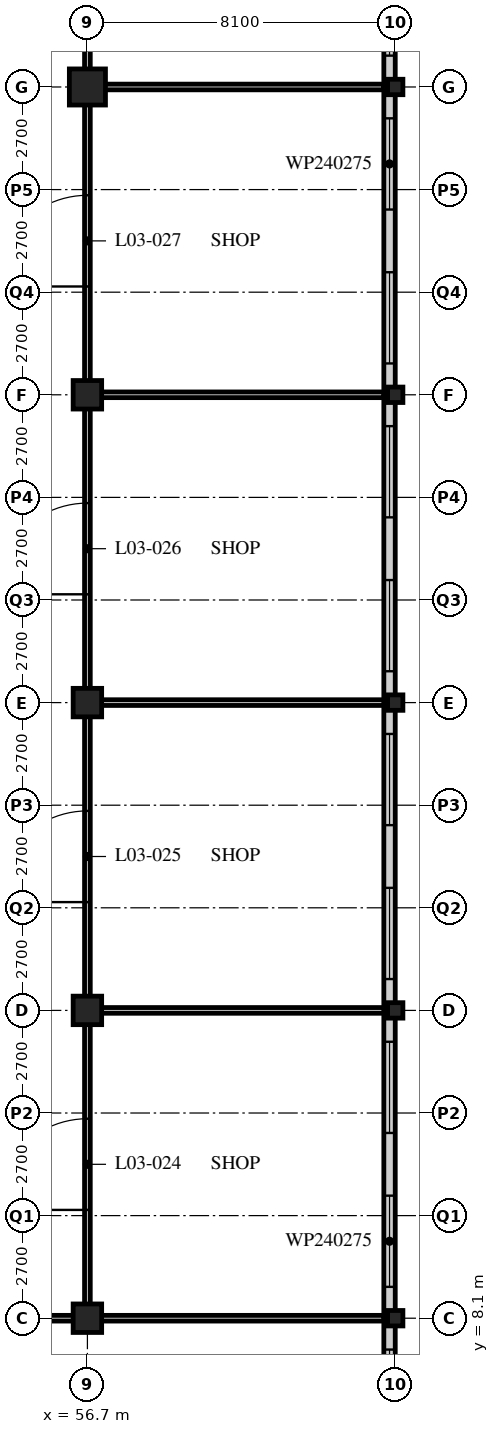
"""IFC4 building model, lengths in metres.
Left out: names, types, materials, properties, quantities, classifications, styles, units other than length and angle.
Written with IfcOpenShell. Run it as: python <this file> out.ifc"""

import sys

from ifc_helpers import new_model, si_unit, direction, frame, frame_2d, origin, origin_2d, place, context, subcontext, project, spatial, rectangle, hollow_rectangle, i_section, extrude, element, fill, save


model = new_model("IFC4")
c1 = context("Model", 3, precision=1e-05, world=origin(), true_north=direction((0.0, 1.0)))
c2 = subcontext(c1, "Body", "Model", "MODEL_VIEW")
j1 = project(units=[si_unit("LENGTHUNIT", "METRE"), si_unit("PLANEANGLEUNIT", "RADIAN")], contexts=[c1])
p1 = place(None, origin())
s1 = spatial("IfcSite", under=j1, at=p1, CompositionType="ELEMENT")
p2 = place(p1, origin())
s2 = spatial("IfcBuilding", under=s1, at=p2, CompositionType="ELEMENT")
p3 = place(p2, frame((0.0, 0.0, 16.8)))
s3 = spatial("IfcBuildingStorey", under=s2, at=p3, CompositionType="ELEMENT", Elevation=16.8)
for number, where, z_axis, x_axis in (
    (1, (56.7, 8.1, 0.0), (0.0, 0.0, 1.0), (1.0, 0.0, 0.0)),
    (2, (56.7, 16.2, 0.0), (0.0, 0.0, 1.0), (1.0, 0.0, 0.0)),
    (3, (56.7, 24.3, 0.0), (0.0, 0.0, 1.0), (1.0, 0.0, 0.0)),
    (4, (56.7, 32.4, 0.0), (0.0, 0.0, 1.0), (1.0, 0.0, 0.0)),
):
    element("IfcColumn", number, at=place(p3, frame(where, z_axis=z_axis, x_axis=x_axis)), inside=s3, PredefinedType="COLUMN", context=c2, shape_type="SweptSolid", body=[
        extrude(hollow_rectangle(XDim=0.75, YDim=0.75, WallThickness=0.07, at=origin_2d()), origin(), (0.0, 0.0, 1.0), 5.4),
    ])
p4 = place(p3, frame((56.7, 40.5, 0.0), z_axis=(0.0, 0.0, 1.0), x_axis=(1.0, 0.0, 0.0)))
e5 = element("IfcColumn", 5, at=p4, inside=s3, PredefinedType="COLUMN", context=c2, shape_type="SweptSolid", body=[
    extrude(hollow_rectangle(XDim=0.95, YDim=0.95, WallThickness=0.1, at=origin_2d()), origin(), (0.0, 0.0, 1.0), 5.4),
])
for number, where, z_axis, x_axis in (
    (6, (64.8, 8.1, 0.0), (0.0, 0.0, 1.0), (1.0, 0.0, 0.0)),
    (7, (64.8, 16.2, 0.0), (0.0, 0.0, 1.0), (1.0, 0.0, 0.0)),
    (8, (64.8, 24.3, 0.0), (0.0, 0.0, 1.0), (1.0, 0.0, 0.0)),
    (9, (64.8, 32.4, 0.0), (0.0, 0.0, 1.0), (1.0, 0.0, 0.0)),
    (10, (64.8, 40.5, 0.0), (0.0, 0.0, 1.0), (1.0, 0.0, 0.0)),
):
    element("IfcColumn", number, at=place(p3, frame(where, z_axis=z_axis, x_axis=x_axis)), inside=s3, PredefinedType="COLUMN", context=c2, shape_type="SweptSolid", body=[
        extrude(i_section(OverallWidth=0.403, OverallDepth=0.406, WebThickness=0.027, FlangeThickness=0.043, FilletRadius=0.015, at=origin_2d()), origin(), (0.0, 0.0, 1.0), 5.4),
    ])
p5 = place(p3, frame((64.65, 0.24, 0.0), z_axis=(0.0, 0.0, 1.0), x_axis=(0.0, 1.0, 0.0)))
e11 = element("IfcWall", 11, at=p5, inside=s3, PredefinedType="SOLIDWALL", context=c2, shape_type="SweptSolid", body=[
    extrude(rectangle(XDim=48.36, YDim=0.3, at=frame_2d((24.18, 0.0))), origin(), (0.0, 0.0, 1.0), 5.15),
])
p6 = place(p5, frame((0.585, 0.0, 1.0)))
e12 = element("IfcOpeningElement", 12, at=p6, cuts=e11, PredefinedType="OPENING", context=c2, shape_type="SweptSolid", body=[
    extrude(rectangle(XDim=2.4, YDim=2.75, at=frame_2d((1.2, 1.375))), frame((0.0, 0.16, 0.0), z_axis=(0.0, -1.0, 0.0), x_axis=(1.0, 0.0, 0.0)), (0.0, 0.0, 1.0), 0.32),
])
p7 = place(p5, frame((4.635, 0.0, 1.0)))
e13 = element("IfcOpeningElement", 13, at=p7, cuts=e11, PredefinedType="OPENING", context=c2, shape_type="SweptSolid", body=[
    extrude(rectangle(XDim=2.4, YDim=2.75, at=frame_2d((1.2, 1.375))), frame((0.0, 0.16, 0.0), z_axis=(0.0, -1.0, 0.0), x_axis=(1.0, 0.0, 0.0)), (0.0, 0.0, 1.0), 0.32),
])
p8 = place(p5, frame((8.685, 0.0, 1.0)))
e14 = element("IfcOpeningElement", 14, at=p8, cuts=e11, PredefinedType="OPENING", context=c2, shape_type="SweptSolid", body=[
    extrude(rectangle(XDim=2.4, YDim=2.75, at=frame_2d((1.2, 1.375))), frame((0.0, 0.16, 0.0), z_axis=(0.0, -1.0, 0.0), x_axis=(1.0, 0.0, 0.0)), (0.0, 0.0, 1.0), 0.32),
])
p9 = place(p5, frame((12.735, 0.0, 1.0)))
e15 = element("IfcOpeningElement", 15, at=p9, cuts=e11, PredefinedType="OPENING", context=c2, shape_type="SweptSolid", body=[
    extrude(rectangle(XDim=2.4, YDim=2.75, at=frame_2d((1.2, 1.375))), frame((0.0, 0.16, 0.0), z_axis=(0.0, -1.0, 0.0), x_axis=(1.0, 0.0, 0.0)), (0.0, 0.0, 1.0), 0.32),
])
p10 = place(p5, frame((16.785, 0.0, 1.0)))
e16 = element("IfcOpeningElement", 16, at=p10, cuts=e11, PredefinedType="OPENING", context=c2, shape_type="SweptSolid", body=[
    extrude(rectangle(XDim=2.4, YDim=2.75, at=frame_2d((1.2, 1.375))), frame((0.0, 0.16, 0.0), z_axis=(0.0, -1.0, 0.0), x_axis=(1.0, 0.0, 0.0)), (0.0, 0.0, 1.0), 0.32),
])
p11 = place(p5, frame((20.835, 0.0, 1.0)))
e17 = element("IfcOpeningElement", 17, at=p11, cuts=e11, PredefinedType="OPENING", context=c2, shape_type="SweptSolid", body=[
    extrude(rectangle(XDim=2.4, YDim=2.75, at=frame_2d((1.2, 1.375))), frame((0.0, 0.16, 0.0), z_axis=(0.0, -1.0, 0.0), x_axis=(1.0, 0.0, 0.0)), (0.0, 0.0, 1.0), 0.32),
])
p12 = place(p5, frame((24.885, 0.0, 1.0)))
e18 = element("IfcOpeningElement", 18, at=p12, cuts=e11, PredefinedType="OPENING", context=c2, shape_type="SweptSolid", body=[
    extrude(rectangle(XDim=2.4, YDim=2.75, at=frame_2d((1.2, 1.375))), frame((0.0, 0.16, 0.0), z_axis=(0.0, -1.0, 0.0), x_axis=(1.0, 0.0, 0.0)), (0.0, 0.0, 1.0), 0.32),
])
p13 = place(p5, frame((28.935, 0.0, 1.0)))
e19 = element("IfcOpeningElement", 19, at=p13, cuts=e11, PredefinedType="OPENING", context=c2, shape_type="SweptSolid", body=[
    extrude(rectangle(XDim=2.4, YDim=2.75, at=frame_2d((1.2, 1.375))), frame((0.0, 0.16, 0.0), z_axis=(0.0, -1.0, 0.0), x_axis=(1.0, 0.0, 0.0)), (0.0, 0.0, 1.0), 0.32),
])
p14 = place(p5, frame((32.985, 0.0, 1.0)))
e20 = element("IfcOpeningElement", 20, at=p14, cuts=e11, PredefinedType="OPENING", context=c2, shape_type="SweptSolid", body=[
    extrude(rectangle(XDim=2.4, YDim=2.75, at=frame_2d((1.2, 1.375))), frame((0.0, 0.16, 0.0), z_axis=(0.0, -1.0, 0.0), x_axis=(1.0, 0.0, 0.0)), (0.0, 0.0, 1.0), 0.32),
])
p15 = place(p5, frame((37.035, 0.0, 1.0)))
e21 = element("IfcOpeningElement", 21, at=p15, cuts=e11, PredefinedType="OPENING", context=c2, shape_type="SweptSolid", body=[
    extrude(rectangle(XDim=2.4, YDim=2.75, at=frame_2d((1.2, 1.375))), frame((0.0, 0.16, 0.0), z_axis=(0.0, -1.0, 0.0), x_axis=(1.0, 0.0, 0.0)), (0.0, 0.0, 1.0), 0.32),
])
p16 = place(p5, frame((41.085, 0.0, 1.0)))
e22 = element("IfcOpeningElement", 22, at=p16, cuts=e11, PredefinedType="OPENING", context=c2, shape_type="SweptSolid", body=[
    extrude(rectangle(XDim=2.4, YDim=2.75, at=frame_2d((1.2, 1.375))), frame((0.0, 0.16, 0.0), z_axis=(0.0, -1.0, 0.0), x_axis=(1.0, 0.0, 0.0)), (0.0, 0.0, 1.0), 0.32),
])
p17 = place(p5, frame((45.135, 0.0, 1.0)))
e23 = element("IfcOpeningElement", 23, at=p17, cuts=e11, PredefinedType="OPENING", context=c2, shape_type="SweptSolid", body=[
    extrude(rectangle(XDim=2.4, YDim=2.75, at=frame_2d((1.2, 1.375))), frame((0.0, 0.16, 0.0), z_axis=(0.0, -1.0, 0.0), x_axis=(1.0, 0.0, 0.0)), (0.0, 0.0, 1.0), 0.32),
])
p18 = place(p3, frame((8.1, 8.1, 0.0), z_axis=(0.0, 0.0, 1.0), x_axis=(1.0, 0.0, 0.0)))
e24 = element("IfcWall", 24, at=p18, inside=s3, PredefinedType="PARTITIONING", context=c2, shape_type="SweptSolid", body=[
    extrude(rectangle(XDim=48.6, YDim=0.15, at=frame_2d((24.3, 0.0))), origin(), (0.0, 0.0, 1.0), 4.538),
])
p19 = place(p18, frame((11.25, 0.0, 0.0)))
e25 = element("IfcOpeningElement", 25, at=p19, cuts=e24, PredefinedType="OPENING", context=c2, shape_type="SweptSolid", body=[
    extrude(rectangle(XDim=1.8, YDim=2.4, at=frame_2d((0.9, 1.2))), frame((0.0, 0.085, 0.0), z_axis=(0.0, -1.0, 0.0), x_axis=(1.0, 0.0, 0.0)), (0.0, 0.0, 1.0), 0.17),
])
p20 = place(p18, frame((19.05, 0.0, 0.0)))
e26 = element("IfcOpeningElement", 26, at=p20, cuts=e24, PredefinedType="OPENING", context=c2, shape_type="SweptSolid", body=[
    extrude(rectangle(XDim=2.4, YDim=2.7, at=frame_2d((1.2, 1.35))), frame((0.0, 0.085, 0.0), z_axis=(0.0, -1.0, 0.0), x_axis=(1.0, 0.0, 0.0)), (0.0, 0.0, 1.0), 0.17),
])
p21 = place(p18, frame((27.15, 0.0, 0.0)))
e27 = element("IfcOpeningElement", 27, at=p21, cuts=e24, PredefinedType="OPENING", context=c2, shape_type="SweptSolid", body=[
    extrude(rectangle(XDim=2.4, YDim=2.7, at=frame_2d((1.2, 1.35))), frame((0.0, 0.085, 0.0), z_axis=(0.0, -1.0, 0.0), x_axis=(1.0, 0.0, 0.0)), (0.0, 0.0, 1.0), 0.17),
])
p22 = place(p18, frame((35.25, 0.0, 0.0)))
e28 = element("IfcOpeningElement", 28, at=p22, cuts=e24, PredefinedType="OPENING", context=c2, shape_type="SweptSolid", body=[
    extrude(rectangle(XDim=2.4, YDim=2.7, at=frame_2d((1.2, 1.35))), frame((0.0, 0.085, 0.0), z_axis=(0.0, -1.0, 0.0), x_axis=(1.0, 0.0, 0.0)), (0.0, 0.0, 1.0), 0.17),
])
p23 = place(p18, frame((2.85, 0.0, 0.0)))
e29 = element("IfcOpeningElement", 29, at=p23, cuts=e24, PredefinedType="OPENING", context=c2, shape_type="SweptSolid", body=[
    extrude(rectangle(XDim=2.4, YDim=2.7, at=frame_2d((1.2, 1.35))), frame((0.0, 0.085, 0.0), z_axis=(0.0, -1.0, 0.0), x_axis=(1.0, 0.0, 0.0)), (0.0, 0.0, 1.0), 0.17),
])
p24 = place(p18, frame((43.35, 0.0, 0.0)))
e30 = element("IfcOpeningElement", 30, at=p24, cuts=e24, PredefinedType="OPENING", context=c2, shape_type="SweptSolid", body=[
    extrude(rectangle(XDim=2.4, YDim=2.7, at=frame_2d((1.2, 1.35))), frame((0.0, 0.085, 0.0), z_axis=(0.0, -1.0, 0.0), x_axis=(1.0, 0.0, 0.0)), (0.0, 0.0, 1.0), 0.17),
])
p25 = place(p3, frame((56.7, 8.1, 0.0), z_axis=(0.0, 0.0, 1.0), x_axis=(0.0, 1.0, 0.0)))
e31 = element("IfcWall", 31, at=p25, inside=s3, PredefinedType="PARTITIONING", context=c2, shape_type="SweptSolid", body=[
    extrude(rectangle(XDim=34.35, YDim=0.15, at=frame_2d((17.175, 0.0))), origin(), (0.0, 0.0, 1.0), 4.538),
])
p26 = place(p25, frame((2.85, 0.0, 0.0)))
e32 = element("IfcOpeningElement", 32, at=p26, cuts=e31, PredefinedType="OPENING", context=c2, shape_type="SweptSolid", body=[
    extrude(rectangle(XDim=2.4, YDim=2.7, at=frame_2d((1.2, 1.35))), frame((0.0, 0.085, 0.0), z_axis=(0.0, -1.0, 0.0), x_axis=(1.0, 0.0, 0.0)), (0.0, 0.0, 1.0), 0.17),
])
p27 = place(p25, frame((10.95, 0.0, 0.0)))
e33 = element("IfcOpeningElement", 33, at=p27, cuts=e31, PredefinedType="OPENING", context=c2, shape_type="SweptSolid", body=[
    extrude(rectangle(XDim=2.4, YDim=2.7, at=frame_2d((1.2, 1.35))), frame((0.0, 0.085, 0.0), z_axis=(0.0, -1.0, 0.0), x_axis=(1.0, 0.0, 0.0)), (0.0, 0.0, 1.0), 0.17),
])
p28 = place(p25, frame((19.05, 0.0, 0.0)))
e34 = element("IfcOpeningElement", 34, at=p28, cuts=e31, PredefinedType="OPENING", context=c2, shape_type="SweptSolid", body=[
    extrude(rectangle(XDim=2.4, YDim=2.7, at=frame_2d((1.2, 1.35))), frame((0.0, 0.085, 0.0), z_axis=(0.0, -1.0, 0.0), x_axis=(1.0, 0.0, 0.0)), (0.0, 0.0, 1.0), 0.17),
])
p29 = place(p25, frame((27.15, 0.0, 0.0)))
e35 = element("IfcOpeningElement", 35, at=p29, cuts=e31, PredefinedType="OPENING", context=c2, shape_type="SweptSolid", body=[
    extrude(rectangle(XDim=2.4, YDim=2.7, at=frame_2d((1.2, 1.35))), frame((0.0, 0.085, 0.0), z_axis=(0.0, -1.0, 0.0), x_axis=(1.0, 0.0, 0.0)), (0.0, 0.0, 1.0), 0.17),
])
for number, where, z_axis, x_axis in (
    (36, (56.7, 16.2, 0.0), (0.0, 0.0, 1.0), (1.0, 0.0, 0.0)),
    (37, (56.7, 24.3, 0.0), (0.0, 0.0, 1.0), (1.0, 0.0, 0.0)),
    (38, (56.7, 32.4, 0.0), (0.0, 0.0, 1.0), (1.0, 0.0, 0.0)),
    (39, (56.7, 8.1, 0.0), (0.0, 0.0, 1.0), (1.0, 0.0, 0.0)),
    (40, (56.7, 40.5, 0.0), (0.0, 0.0, 1.0), (1.0, 0.0, 0.0)),
):
    element("IfcWall", number, at=place(p3, frame(where, z_axis=z_axis, x_axis=x_axis)), inside=s3, PredefinedType="PARTITIONING", context=c2, shape_type="SweptSolid", body=[
        extrude(rectangle(XDim=7.8, YDim=0.15, at=frame_2d((3.9, 0.0))), origin(), (0.0, 0.0, 1.0), 4.538),
    ])
p30 = place(p7, origin())
e41 = element("IfcWindow", 41, at=p30, inside=s3, PartitioningType="SINGLE_PANEL", PredefinedType="WINDOW", context=c2, shape_type="SweptSolid", body=[
    extrude(rectangle(XDim=2.4, YDim=2.75, at=frame_2d((1.2, 1.375))), frame((0.0, 0.03, 0.0), z_axis=(0.0, -1.0, 0.0), x_axis=(1.0, 0.0, 0.0)), (0.0, 0.0, 1.0), 0.06),
])
fill(e13, e41)
p31 = place(p8, origin())
e42 = element("IfcWindow", 42, at=p31, inside=s3, PartitioningType="SINGLE_PANEL", PredefinedType="WINDOW", context=c2, shape_type="SweptSolid", body=[
    extrude(rectangle(XDim=2.4, YDim=2.75, at=frame_2d((1.2, 1.375))), frame((0.0, 0.03, 0.0), z_axis=(0.0, -1.0, 0.0), x_axis=(1.0, 0.0, 0.0)), (0.0, 0.0, 1.0), 0.06),
])
fill(e14, e42)
p32 = place(p9, origin())
e43 = element("IfcWindow", 43, at=p32, inside=s3, PartitioningType="SINGLE_PANEL", PredefinedType="WINDOW", context=c2, shape_type="SweptSolid", body=[
    extrude(rectangle(XDim=2.4, YDim=2.75, at=frame_2d((1.2, 1.375))), frame((0.0, 0.03, 0.0), z_axis=(0.0, -1.0, 0.0), x_axis=(1.0, 0.0, 0.0)), (0.0, 0.0, 1.0), 0.06),
])
fill(e15, e43)
p33 = place(p10, origin())
e44 = element("IfcWindow", 44, at=p33, inside=s3, PartitioningType="SINGLE_PANEL", PredefinedType="WINDOW", context=c2, shape_type="SweptSolid", body=[
    extrude(rectangle(XDim=2.4, YDim=2.75, at=frame_2d((1.2, 1.375))), frame((0.0, 0.03, 0.0), z_axis=(0.0, -1.0, 0.0), x_axis=(1.0, 0.0, 0.0)), (0.0, 0.0, 1.0), 0.06),
])
fill(e16, e44)
p34 = place(p11, origin())
e45 = element("IfcWindow", 45, at=p34, inside=s3, PartitioningType="SINGLE_PANEL", PredefinedType="WINDOW", context=c2, shape_type="SweptSolid", body=[
    extrude(rectangle(XDim=2.4, YDim=2.75, at=frame_2d((1.2, 1.375))), frame((0.0, 0.03, 0.0), z_axis=(0.0, -1.0, 0.0), x_axis=(1.0, 0.0, 0.0)), (0.0, 0.0, 1.0), 0.06),
])
fill(e17, e45)
p35 = place(p12, origin())
e46 = element("IfcWindow", 46, at=p35, inside=s3, PartitioningType="SINGLE_PANEL", PredefinedType="WINDOW", context=c2, shape_type="SweptSolid", body=[
    extrude(rectangle(XDim=2.4, YDim=2.75, at=frame_2d((1.2, 1.375))), frame((0.0, 0.03, 0.0), z_axis=(0.0, -1.0, 0.0), x_axis=(1.0, 0.0, 0.0)), (0.0, 0.0, 1.0), 0.06),
])
fill(e18, e46)
p36 = place(p13, origin())
e47 = element("IfcWindow", 47, at=p36, inside=s3, PartitioningType="SINGLE_PANEL", PredefinedType="WINDOW", context=c2, shape_type="SweptSolid", body=[
    extrude(rectangle(XDim=2.4, YDim=2.75, at=frame_2d((1.2, 1.375))), frame((0.0, 0.03, 0.0), z_axis=(0.0, -1.0, 0.0), x_axis=(1.0, 0.0, 0.0)), (0.0, 0.0, 1.0), 0.06),
])
fill(e19, e47)
p37 = place(p14, origin())
e48 = element("IfcWindow", 48, at=p37, inside=s3, PartitioningType="SINGLE_PANEL", PredefinedType="WINDOW", context=c2, shape_type="SweptSolid", body=[
    extrude(rectangle(XDim=2.4, YDim=2.75, at=frame_2d((1.2, 1.375))), frame((0.0, 0.03, 0.0), z_axis=(0.0, -1.0, 0.0), x_axis=(1.0, 0.0, 0.0)), (0.0, 0.0, 1.0), 0.06),
])
fill(e20, e48)
p38 = place(p15, origin())
e49 = element("IfcWindow", 49, at=p38, inside=s3, PartitioningType="SINGLE_PANEL", PredefinedType="WINDOW", context=c2, shape_type="SweptSolid", body=[
    extrude(rectangle(XDim=2.4, YDim=2.75, at=frame_2d((1.2, 1.375))), frame((0.0, 0.03, 0.0), z_axis=(0.0, -1.0, 0.0), x_axis=(1.0, 0.0, 0.0)), (0.0, 0.0, 1.0), 0.06),
])
fill(e21, e49)
p39 = place(p16, origin())
e50 = element("IfcWindow", 50, at=p39, inside=s3, PartitioningType="SINGLE_PANEL", PredefinedType="WINDOW", context=c2, shape_type="SweptSolid", body=[
    extrude(rectangle(XDim=2.4, YDim=2.75, at=frame_2d((1.2, 1.375))), frame((0.0, 0.03, 0.0), z_axis=(0.0, -1.0, 0.0), x_axis=(1.0, 0.0, 0.0)), (0.0, 0.0, 1.0), 0.06),
])
fill(e22, e50)
p40 = place(p26, origin())
e51 = element("IfcDoor", 51, at=p40, inside=s3, OperationType="DOUBLE_DOOR_SINGLE_SWING", PredefinedType="DOOR", context=c2, shape_type="SweptSolid", body=[
    extrude(rectangle(XDim=2.4, YDim=2.7, at=frame_2d((1.2, 1.35))), frame((0.0, 0.025, 0.0), z_axis=(0.0, -1.0, 0.0), x_axis=(1.0, 0.0, 0.0)), (0.0, 0.0, 1.0), 0.05),
])
fill(e32, e51)
p41 = place(p27, origin())
e52 = element("IfcDoor", 52, at=p41, inside=s3, OperationType="DOUBLE_DOOR_SINGLE_SWING", PredefinedType="DOOR", context=c2, shape_type="SweptSolid", body=[
    extrude(rectangle(XDim=2.4, YDim=2.7, at=frame_2d((1.2, 1.35))), frame((0.0, 0.025, 0.0), z_axis=(0.0, -1.0, 0.0), x_axis=(1.0, 0.0, 0.0)), (0.0, 0.0, 1.0), 0.05),
])
fill(e33, e52)
p42 = place(p28, origin())
e53 = element("IfcDoor", 53, at=p42, inside=s3, OperationType="DOUBLE_DOOR_SINGLE_SWING", PredefinedType="DOOR", context=c2, shape_type="SweptSolid", body=[
    extrude(rectangle(XDim=2.4, YDim=2.7, at=frame_2d((1.2, 1.35))), frame((0.0, 0.025, 0.0), z_axis=(0.0, -1.0, 0.0), x_axis=(1.0, 0.0, 0.0)), (0.0, 0.0, 1.0), 0.05),
])
fill(e34, e53)
p43 = place(p29, origin())
e54 = element("IfcDoor", 54, at=p43, inside=s3, OperationType="DOUBLE_DOOR_SINGLE_SWING", PredefinedType="DOOR", context=c2, shape_type="SweptSolid", body=[
    extrude(rectangle(XDim=2.4, YDim=2.7, at=frame_2d((1.2, 1.35))), frame((0.0, 0.025, 0.0), z_axis=(0.0, -1.0, 0.0), x_axis=(1.0, 0.0, 0.0)), (0.0, 0.0, 1.0), 0.05),
])
fill(e35, e54)
save(model, sys.argv[1])
